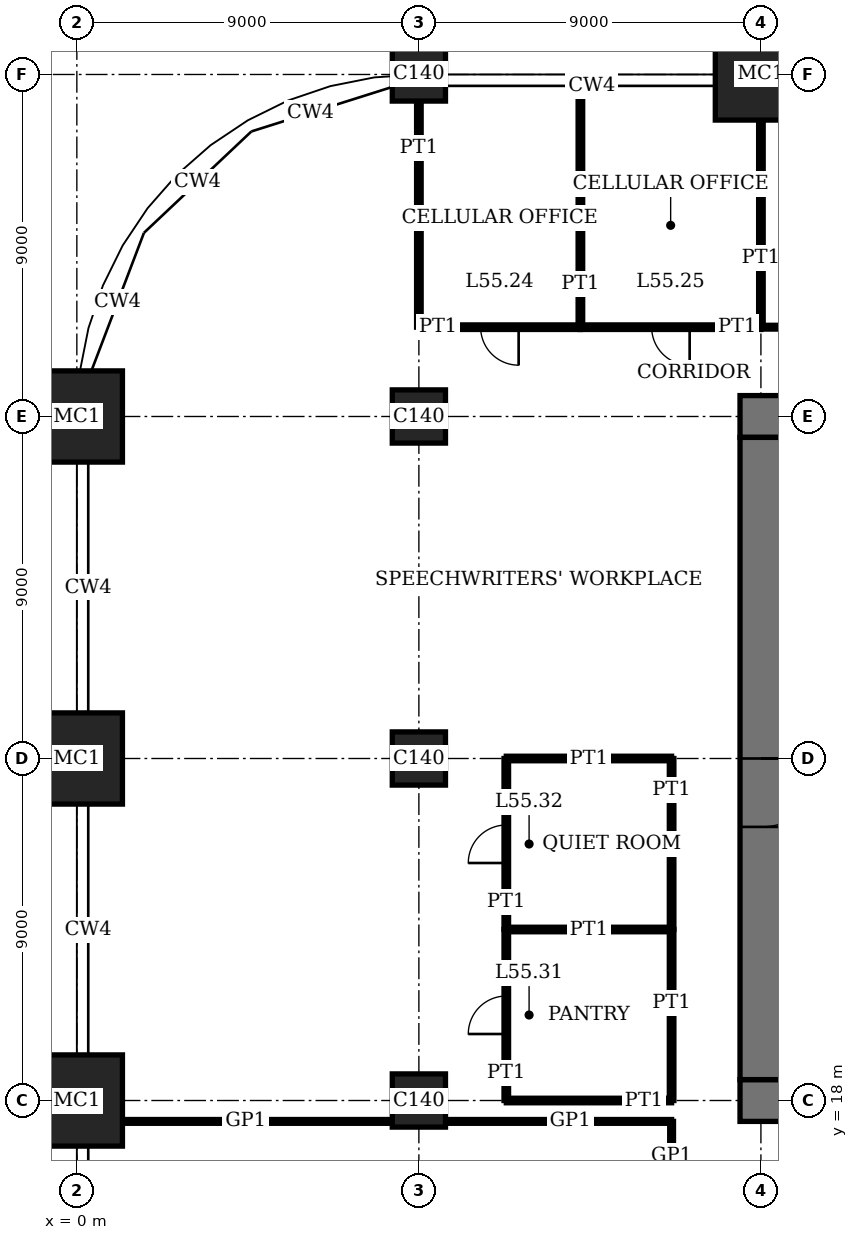
"""IFC4 building model, lengths in metres.
Left out: names, types, materials, properties, quantities, classifications, styles, units other than length and angle.
Written with IfcOpenShell. Run it as: python <this file> out.ifc"""

import sys

from ifc_helpers import new_model, si_unit, direction, frame, frame_2d, origin, origin_2d, place, context, subcontext, project, spatial, rectangle, extrude, element, fill, save


model = new_model("IFC4")
c1 = context("Model", 3, precision=1e-05, world=origin(), true_north=direction((0.0, 1.0)))
c2 = subcontext(c1, "Body", "Model", "MODEL_VIEW")
j1 = project(units=[si_unit("LENGTHUNIT", "METRE"), si_unit("PLANEANGLEUNIT", "RADIAN")], contexts=[c1])
p1 = place(None, origin())
s1 = spatial("IfcSite", under=j1, at=p1, CompositionType="ELEMENT")
p2 = place(p1, origin())
s2 = spatial("IfcBuilding", under=s1, at=p2, CompositionType="ELEMENT")
p3 = place(p2, frame((0.0, 0.0, 226.2)))
s3 = spatial("IfcBuildingStorey", under=s2, at=p3, CompositionType="ELEMENT", Elevation=226.2)
for number, where, z_axis, x_axis in (
    (1, (0.0, 18.0, 0.0), (0.0, 0.0, 1.0), (1.0, 0.0, 0.0)),
    (2, (0.0, 27.0, 0.0), (0.0, 0.0, 1.0), (1.0, 0.0, 0.0)),
    (3, (0.0, 36.0, 0.0), (0.0, 0.0, 1.0), (1.0, 0.0, 0.0)),
):
    element("IfcColumn", number, at=place(p3, frame(where, z_axis=z_axis, x_axis=x_axis)), inside=s3, PredefinedType="COLUMN", context=c2, shape_type="SweptSolid", body=[
        extrude(rectangle(XDim=2.4, YDim=2.4, at=origin_2d()), origin(), (0.0, 0.0, 1.0), 4.0),
    ])
for number, where, z_axis, x_axis in (
    (4, (9.0, 18.0, 0.0), (0.0, 0.0, 1.0), (1.0, 0.0, 0.0)),
    (5, (9.0, 27.0, 0.0), (0.0, 0.0, 1.0), (1.0, 0.0, 0.0)),
    (6, (9.0, 36.0, 0.0), (0.0, 0.0, 1.0), (1.0, 0.0, 0.0)),
    (7, (9.0, 45.0, 0.0), (0.0, 0.0, 1.0), (1.0, 0.0, 0.0)),
):
    element("IfcColumn", number, at=place(p3, frame(where, z_axis=z_axis, x_axis=x_axis)), inside=s3, PredefinedType="COLUMN", context=c2, shape_type="SweptSolid", body=[
        extrude(rectangle(XDim=1.4, YDim=1.4, at=origin_2d()), origin(), (0.0, 0.0, 1.0), 4.0),
    ])
p4 = place(p3, frame((18.0, 45.0, 0.0), z_axis=(0.0, 0.0, 1.0), x_axis=(1.0, 0.0, 0.0)))
e8 = element("IfcColumn", 8, at=p4, inside=s3, PredefinedType="COLUMN", context=c2, shape_type="SweptSolid", body=[
    extrude(rectangle(XDim=2.4, YDim=2.4, at=origin_2d()), origin(), (0.0, 0.0, 1.0), 4.0),
])
p5 = place(p3, frame((17.45, 18.0, 0.0), z_axis=(0.0, 0.0, 1.0), x_axis=(1.0, 0.0, 0.0)))
e9 = element("IfcWall", 9, at=p5, inside=s3, PredefinedType="SHEAR", context=c2, shape_type="SweptSolid", body=[
    extrude(rectangle(XDim=28.1, YDim=1.1, at=frame_2d((14.05, 0.0))), origin(), (0.0, 0.0, 1.0), 4.0),
])
p6 = place(p5, frame((11.55, 0.0, 0.0)))
e10 = element("IfcOpeningElement", 10, at=p6, cuts=e9, PredefinedType="OPENING", context=c2, shape_type="SweptSolid", body=[
    extrude(rectangle(XDim=1.0, YDim=2.4, at=frame_2d((0.5, 1.2))), frame((0.0, 0.56, 0.0), z_axis=(0.0, -1.0, 0.0), x_axis=(1.0, 0.0, 0.0)), (0.0, 0.0, 1.0), 1.12),
])
p7 = place(p5, frame((16.55, 0.0, 0.0)))
e11 = element("IfcOpeningElement", 11, at=p7, cuts=e9, PredefinedType="OPENING", context=c2, shape_type="SweptSolid", body=[
    extrude(rectangle(XDim=1.0, YDim=2.4, at=frame_2d((0.5, 1.2))), frame((0.0, 0.56, 0.0), z_axis=(0.0, -1.0, 0.0), x_axis=(1.0, 0.0, 0.0)), (0.0, 0.0, 1.0), 1.12),
])
p8 = place(p5, frame((20.0, 0.0, 0.0)))
e12 = element("IfcOpeningElement", 12, at=p8, cuts=e9, PredefinedType="OPENING", context=c2, shape_type="SweptSolid", body=[
    extrude(rectangle(XDim=1.1, YDim=2.4, at=frame_2d((0.55, 1.2))), frame((0.0, 0.56, 0.0), z_axis=(0.0, -1.0, 0.0), x_axis=(1.0, 0.0, 0.0)), (0.0, 0.0, 1.0), 1.12),
])
p9 = place(p5, frame((24.05, 0.0, 0.0)))
e13 = element("IfcOpeningElement", 13, at=p9, cuts=e9, PredefinedType="OPENING", context=c2, shape_type="SweptSolid", body=[
    extrude(rectangle(XDim=1.0, YDim=2.4, at=frame_2d((0.5, 1.2))), frame((0.0, 0.56, 0.0), z_axis=(0.0, -1.0, 0.0), x_axis=(1.0, 0.0, 0.0)), (0.0, 0.0, 1.0), 1.12),
])
p10 = place(p3, frame((45.55, 36.0, 0.0), z_axis=(0.0, 0.0, 1.0), x_axis=(-1.0, 0.0, 0.0)))
e14 = element("IfcWall", 14, at=p10, inside=s3, PredefinedType="SHEAR", context=c2, shape_type="SweptSolid", body=[
    extrude(rectangle(XDim=28.1, YDim=1.1, at=frame_2d((14.05, 0.0))), origin(), (0.0, 0.0, 1.0), 4.0),
])
p11 = place(p10, frame((11.55, 0.0, 0.0)))
e15 = element("IfcOpeningElement", 15, at=p11, cuts=e14, PredefinedType="OPENING", context=c2, shape_type="SweptSolid", body=[
    extrude(rectangle(XDim=1.0, YDim=2.4, at=frame_2d((0.5, 1.2))), frame((0.0, 0.56, 0.0), z_axis=(0.0, -1.0, 0.0), x_axis=(1.0, 0.0, 0.0)), (0.0, 0.0, 1.0), 1.12),
])
p12 = place(p10, frame((16.55, 0.0, 0.0)))
e16 = element("IfcOpeningElement", 16, at=p12, cuts=e14, PredefinedType="OPENING", context=c2, shape_type="SweptSolid", body=[
    extrude(rectangle(XDim=1.0, YDim=2.4, at=frame_2d((0.5, 1.2))), frame((0.0, 0.56, 0.0), z_axis=(0.0, -1.0, 0.0), x_axis=(1.0, 0.0, 0.0)), (0.0, 0.0, 1.0), 1.12),
])
p13 = place(p10, frame((20.0, 0.0, 0.0)))
e17 = element("IfcOpeningElement", 17, at=p13, cuts=e14, PredefinedType="OPENING", context=c2, shape_type="SweptSolid", body=[
    extrude(rectangle(XDim=1.1, YDim=2.4, at=frame_2d((0.55, 1.2))), frame((0.0, 0.56, 0.0), z_axis=(0.0, -1.0, 0.0), x_axis=(1.0, 0.0, 0.0)), (0.0, 0.0, 1.0), 1.12),
])
p14 = place(p10, frame((24.05, 0.0, 0.0)))
e18 = element("IfcOpeningElement", 18, at=p14, cuts=e14, PredefinedType="OPENING", context=c2, shape_type="SweptSolid", body=[
    extrude(rectangle(XDim=1.0, YDim=2.4, at=frame_2d((0.5, 1.2))), frame((0.0, 0.56, 0.0), z_axis=(0.0, -1.0, 0.0), x_axis=(1.0, 0.0, 0.0)), (0.0, 0.0, 1.0), 1.12),
])
p15 = place(p3, frame((18.0, 35.45, 0.0), z_axis=(0.0, 0.0, 1.0), x_axis=(0.0, -1.0, 0.0)))
e19 = element("IfcWall", 19, at=p15, inside=s3, PredefinedType="SHEAR", context=c2, shape_type="SweptSolid", body=[
    extrude(rectangle(XDim=16.9, YDim=1.1, at=frame_2d((8.45, 0.0))), origin(), (0.0, 0.0, 1.0), 4.0),
])
p16 = place(p15, frame((8.45, 0.0, 0.0)))
e20 = element("IfcOpeningElement", 20, at=p16, cuts=e19, PredefinedType="OPENING", context=c2, shape_type="SweptSolid", body=[
    extrude(rectangle(XDim=1.8, YDim=2.4, at=frame_2d((0.9, 1.2))), frame((0.0, 0.56, 0.0), z_axis=(0.0, -1.0, 0.0), x_axis=(1.0, 0.0, 0.0)), (0.0, 0.0, 1.0), 1.12),
])
p17 = place(p3, frame((1.2, 17.45, 0.0), z_axis=(0.0, 0.0, 1.0), x_axis=(1.0, 0.0, 0.0)))
e21 = element("IfcWall", 21, at=p17, inside=s3, PredefinedType="PARTITIONING", context=c2, shape_type="SweptSolid", body=[
    extrude(rectangle(XDim=7.1, YDim=0.1, at=frame_2d((3.55, 0.0))), origin(), (0.0, 0.0, 1.0), 3.05),
])
p18 = place(p3, frame((9.7, 17.45, 0.0), z_axis=(0.0, 0.0, 1.0), x_axis=(1.0, 0.0, 0.0)))
e22 = element("IfcWall", 22, at=p18, inside=s3, PredefinedType="PARTITIONING", context=c2, shape_type="SweptSolid", body=[
    extrude(rectangle(XDim=5.95, YDim=0.1, at=frame_2d((2.975, 0.0))), origin(), (0.0, 0.0, 1.0), 3.05),
])
p19 = place(p3, frame((11.3, 18.0, 0.0), z_axis=(0.0, 0.0, 1.0), x_axis=(1.0, 0.0, 0.0)))
e23 = element("IfcWall", 23, at=p19, inside=s3, PredefinedType="PARTITIONING", context=c2, shape_type="SweptSolid", body=[
    extrude(rectangle(XDim=4.35, YDim=0.12, at=frame_2d((2.175, 0.0))), origin(), (0.0, 0.0, 1.0), 3.05),
])
p20 = place(p3, frame((11.3, 22.5, 0.0), z_axis=(0.0, 0.0, 1.0), x_axis=(1.0, 0.0, 0.0)))
e24 = element("IfcWall", 24, at=p20, inside=s3, PredefinedType="PARTITIONING", context=c2, shape_type="SweptSolid", body=[
    extrude(rectangle(XDim=4.35, YDim=0.12, at=frame_2d((2.175, 0.0))), origin(), (0.0, 0.0, 1.0), 3.1),
])
p21 = place(p3, frame((11.3, 27.0, 0.0), z_axis=(0.0, 0.0, 1.0), x_axis=(1.0, 0.0, 0.0)))
e25 = element("IfcWall", 25, at=p21, inside=s3, PredefinedType="PARTITIONING", context=c2, shape_type="SweptSolid", body=[
    extrude(rectangle(XDim=4.35, YDim=0.12, at=frame_2d((2.175, 0.0))), origin(), (0.0, 0.0, 1.0), 3.05),
])
p22 = place(p3, frame((9.0, 38.35, 0.0), z_axis=(0.0, 0.0, 1.0), x_axis=(1.0, 0.0, 0.0)))
e26 = element("IfcWall", 26, at=p22, inside=s3, PredefinedType="PARTITIONING", context=c2, shape_type="SweptSolid", body=[
    extrude(rectangle(XDim=4.25, YDim=0.12, at=frame_2d((2.125, 0.0))), origin(), (0.0, 0.0, 1.0), 3.75),
])
p23 = place(p22, frame((1.625, 0.0, 0.0)))
e27 = element("IfcOpeningElement", 27, at=p23, cuts=e26, PredefinedType="OPENING", context=c2, shape_type="SweptSolid", body=[
    extrude(rectangle(XDim=1.0, YDim=2.4, at=frame_2d((0.5, 1.2))), frame((0.0, 0.07, 0.0), z_axis=(0.0, -1.0, 0.0), x_axis=(1.0, 0.0, 0.0)), (0.0, 0.0, 1.0), 0.14),
])
p24 = place(p3, frame((13.25, 38.35, 0.0), z_axis=(0.0, 0.0, 1.0), x_axis=(1.0, 0.0, 0.0)))
e28 = element("IfcWall", 28, at=p24, inside=s3, PredefinedType="PARTITIONING", context=c2, shape_type="SweptSolid", body=[
    extrude(rectangle(XDim=4.75, YDim=0.12, at=frame_2d((2.375, 0.0))), origin(), (0.0, 0.0, 1.0), 3.75),
])
p25 = place(p24, frame((1.875, 0.0, 0.0)))
e29 = element("IfcOpeningElement", 29, at=p25, cuts=e28, PredefinedType="OPENING", context=c2, shape_type="SweptSolid", body=[
    extrude(rectangle(XDim=1.0, YDim=2.4, at=frame_2d((0.5, 1.2))), frame((0.0, 0.07, 0.0), z_axis=(0.0, -1.0, 0.0), x_axis=(1.0, 0.0, 0.0)), (0.0, 0.0, 1.0), 0.14),
])
p26 = place(p3, frame((18.0, 38.35, 0.0), z_axis=(0.0, 0.0, 1.0), x_axis=(1.0, 0.0, 0.0)))
e30 = element("IfcWall", 30, at=p26, inside=s3, PredefinedType="PARTITIONING", context=c2, shape_type="SweptSolid", body=[
    extrude(rectangle(XDim=9.0, YDim=0.1, at=frame_2d((4.5, 0.0))), origin(), (0.0, 0.0, 1.0), 3.75),
])
p27 = place(p26, frame((4.0, 0.0, 0.0)))
e31 = element("IfcOpeningElement", 31, at=p27, cuts=e30, PredefinedType="OPENING", context=c2, shape_type="SweptSolid", body=[
    extrude(rectangle(XDim=1.0, YDim=2.4, at=frame_2d((0.5, 1.2))), frame((0.0, 0.06, 0.0), z_axis=(0.0, -1.0, 0.0), x_axis=(1.0, 0.0, 0.0)), (0.0, 0.0, 1.0), 0.12),
])
p28 = place(p3, frame((9.0, 38.35, 0.0), z_axis=(0.0, 0.0, 1.0), x_axis=(0.0, 1.0, 0.0)))
e32 = element("IfcWall", 32, at=p28, inside=s3, PredefinedType="PARTITIONING", context=c2, shape_type="SweptSolid", body=[
    extrude(rectangle(XDim=5.95, YDim=0.12, at=frame_2d((2.975, 0.0))), origin(), (0.0, 0.0, 1.0), 3.05),
])
p29 = place(p3, frame((11.3, 18.0, 0.0), z_axis=(0.0, 0.0, 1.0), x_axis=(0.0, 1.0, 0.0)))
e33 = element("IfcWall", 33, at=p29, inside=s3, PredefinedType="PARTITIONING", context=c2, shape_type="SweptSolid", body=[
    extrude(rectangle(XDim=4.5, YDim=0.12, at=frame_2d((2.25, 0.0))), origin(), (0.0, 0.0, 1.0), 3.75),
])
p30 = place(p29, frame((1.75, 0.0, 0.0)))
e34 = element("IfcOpeningElement", 34, at=p30, cuts=e33, PredefinedType="OPENING", context=c2, shape_type="SweptSolid", body=[
    extrude(rectangle(XDim=1.0, YDim=2.4, at=frame_2d((0.5, 1.2))), frame((0.0, 0.07, 0.0), z_axis=(0.0, -1.0, 0.0), x_axis=(1.0, 0.0, 0.0)), (0.0, 0.0, 1.0), 0.14),
])
p31 = place(p3, frame((11.3, 22.5, 0.0), z_axis=(0.0, 0.0, 1.0), x_axis=(0.0, 1.0, 0.0)))
e35 = element("IfcWall", 35, at=p31, inside=s3, PredefinedType="PARTITIONING", context=c2, shape_type="SweptSolid", body=[
    extrude(rectangle(XDim=4.5, YDim=0.12, at=frame_2d((2.25, 0.0))), origin(), (0.0, 0.0, 1.0), 3.75),
])
p32 = place(p31, frame((1.75, 0.0, 0.0)))
e36 = element("IfcOpeningElement", 36, at=p32, cuts=e35, PredefinedType="OPENING", context=c2, shape_type="SweptSolid", body=[
    extrude(rectangle(XDim=1.0, YDim=2.4, at=frame_2d((0.5, 1.2))), frame((0.0, 0.07, 0.0), z_axis=(0.0, -1.0, 0.0), x_axis=(1.0, 0.0, 0.0)), (0.0, 0.0, 1.0), 0.14),
])
p33 = place(p3, frame((13.25, 38.35, 0.0), z_axis=(0.0, 0.0, 1.0), x_axis=(0.0, 1.0, 0.0)))
e37 = element("IfcWall", 37, at=p33, inside=s3, PredefinedType="PARTITIONING", context=c2, shape_type="SweptSolid", body=[
    extrude(rectangle(XDim=6.34, YDim=0.12, at=frame_2d((3.17, 0.0))), origin(), (0.0, 0.0, 1.0), 3.75),
])
for number, where, z_axis, x_axis in (
    (38, (15.65, 18.0, 0.0), (0.0, 0.0, 1.0), (0.0, 1.0, 0.0)),
    (39, (15.65, 22.5, 0.0), (0.0, 0.0, 1.0), (0.0, 1.0, 0.0)),
):
    element("IfcWall", number, at=place(p3, frame(where, z_axis=z_axis, x_axis=x_axis)), inside=s3, PredefinedType="PARTITIONING", context=c2, shape_type="SweptSolid", body=[
        extrude(rectangle(XDim=4.5, YDim=0.12, at=frame_2d((2.25, 0.0))), origin(), (0.0, 0.0, 1.0), 3.75),
    ])
p34 = place(p3, frame((15.65, 15.65, 0.0), z_axis=(0.0, 0.0, 1.0), x_axis=(0.0, 1.0, 0.0)))
e40 = element("IfcWall", 40, at=p34, inside=s3, PredefinedType="PARTITIONING", context=c2, shape_type="SweptSolid", body=[
    extrude(rectangle(XDim=1.8, YDim=0.1, at=frame_2d((0.9, 0.0))), origin(), (0.0, 0.0, 1.0), 3.75),
])
p35 = place(p3, frame((18.0, 38.35, 0.0), z_axis=(0.0, 0.0, 1.0), x_axis=(0.0, 1.0, 0.0)))
e41 = element("IfcWall", 41, at=p35, inside=s3, PredefinedType="PARTITIONING", context=c2, shape_type="SweptSolid", body=[
    extrude(rectangle(XDim=5.45, YDim=0.12, at=frame_2d((2.725, 0.0))), origin(), (0.0, 0.0, 1.0), 3.05),
])
p36 = place(p16, origin())
e42 = element("IfcDoor", 42, at=p36, inside=s3, OperationType="DOUBLE_DOOR_DOUBLE_SWING", PredefinedType="DOOR", context=c2, shape_type="SweptSolid", body=[
    extrude(rectangle(XDim=1.8, YDim=2.4, at=frame_2d((0.9, 1.2))), frame((0.0, 0.03, 0.0), z_axis=(0.0, -1.0, 0.0), x_axis=(1.0, 0.0, 0.0)), (0.0, 0.0, 1.0), 0.06),
    extrude(rectangle(XDim=0.04, YDim=2.4, at=frame_2d((0.02, 1.2))), frame((0.0, 0.55, 0.0), z_axis=(0.0, -1.0, 0.0), x_axis=(1.0, 0.0, 0.0)), (0.0, 0.0, 1.0), 1.1),
    extrude(rectangle(XDim=0.04, YDim=2.4, at=frame_2d((1.78, 1.2))), frame((0.0, 0.55, 0.0), z_axis=(0.0, -1.0, 0.0), x_axis=(1.0, 0.0, 0.0)), (0.0, 0.0, 1.0), 1.1),
    extrude(rectangle(XDim=1.8, YDim=0.04, at=frame_2d((0.9, 2.38))), frame((0.0, 0.55, 0.0), z_axis=(0.0, -1.0, 0.0), x_axis=(1.0, 0.0, 0.0)), (0.0, 0.0, 1.0), 1.1),
])
fill(e20, e42)
p37 = place(p23, origin())
e43 = element("IfcDoor", 43, at=p37, inside=s3, OperationType="SINGLE_SWING_RIGHT", PredefinedType="DOOR", context=c2, shape_type="SweptSolid", body=[
    extrude(rectangle(XDim=1.0, YDim=2.4, at=frame_2d((0.5, 1.2))), frame((0.0, 0.025, 0.0), z_axis=(0.0, -1.0, 0.0), x_axis=(1.0, 0.0, 0.0)), (0.0, 0.0, 1.0), 0.05),
])
fill(e27, e43)
p38 = place(p25, origin())
e44 = element("IfcDoor", 44, at=p38, inside=s3, OperationType="SINGLE_SWING_RIGHT", PredefinedType="DOOR", context=c2, shape_type="SweptSolid", body=[
    extrude(rectangle(XDim=1.0, YDim=2.4, at=frame_2d((0.5, 1.2))), frame((0.0, 0.025, 0.0), z_axis=(0.0, -1.0, 0.0), x_axis=(1.0, 0.0, 0.0)), (0.0, 0.0, 1.0), 0.05),
])
fill(e29, e44)
p39 = place(p30, origin())
e45 = element("IfcDoor", 45, at=p39, inside=s3, OperationType="SINGLE_SWING_RIGHT", PredefinedType="DOOR", context=c2, shape_type="SweptSolid", body=[
    extrude(rectangle(XDim=1.0, YDim=2.4, at=frame_2d((0.5, 1.2))), frame((0.0, 0.025, 0.0), z_axis=(0.0, -1.0, 0.0), x_axis=(1.0, 0.0, 0.0)), (0.0, 0.0, 1.0), 0.05),
])
fill(e34, e45)
p40 = place(p32, origin())
e46 = element("IfcDoor", 46, at=p40, inside=s3, OperationType="SINGLE_SWING_RIGHT", PredefinedType="DOOR", context=c2, shape_type="SweptSolid", body=[
    extrude(rectangle(XDim=1.0, YDim=2.4, at=frame_2d((0.5, 1.2))), frame((0.0, 0.025, 0.0), z_axis=(0.0, -1.0, 0.0), x_axis=(1.0, 0.0, 0.0)), (0.0, 0.0, 1.0), 0.05),
])
fill(e36, e46)
save(model, sys.argv[1])
